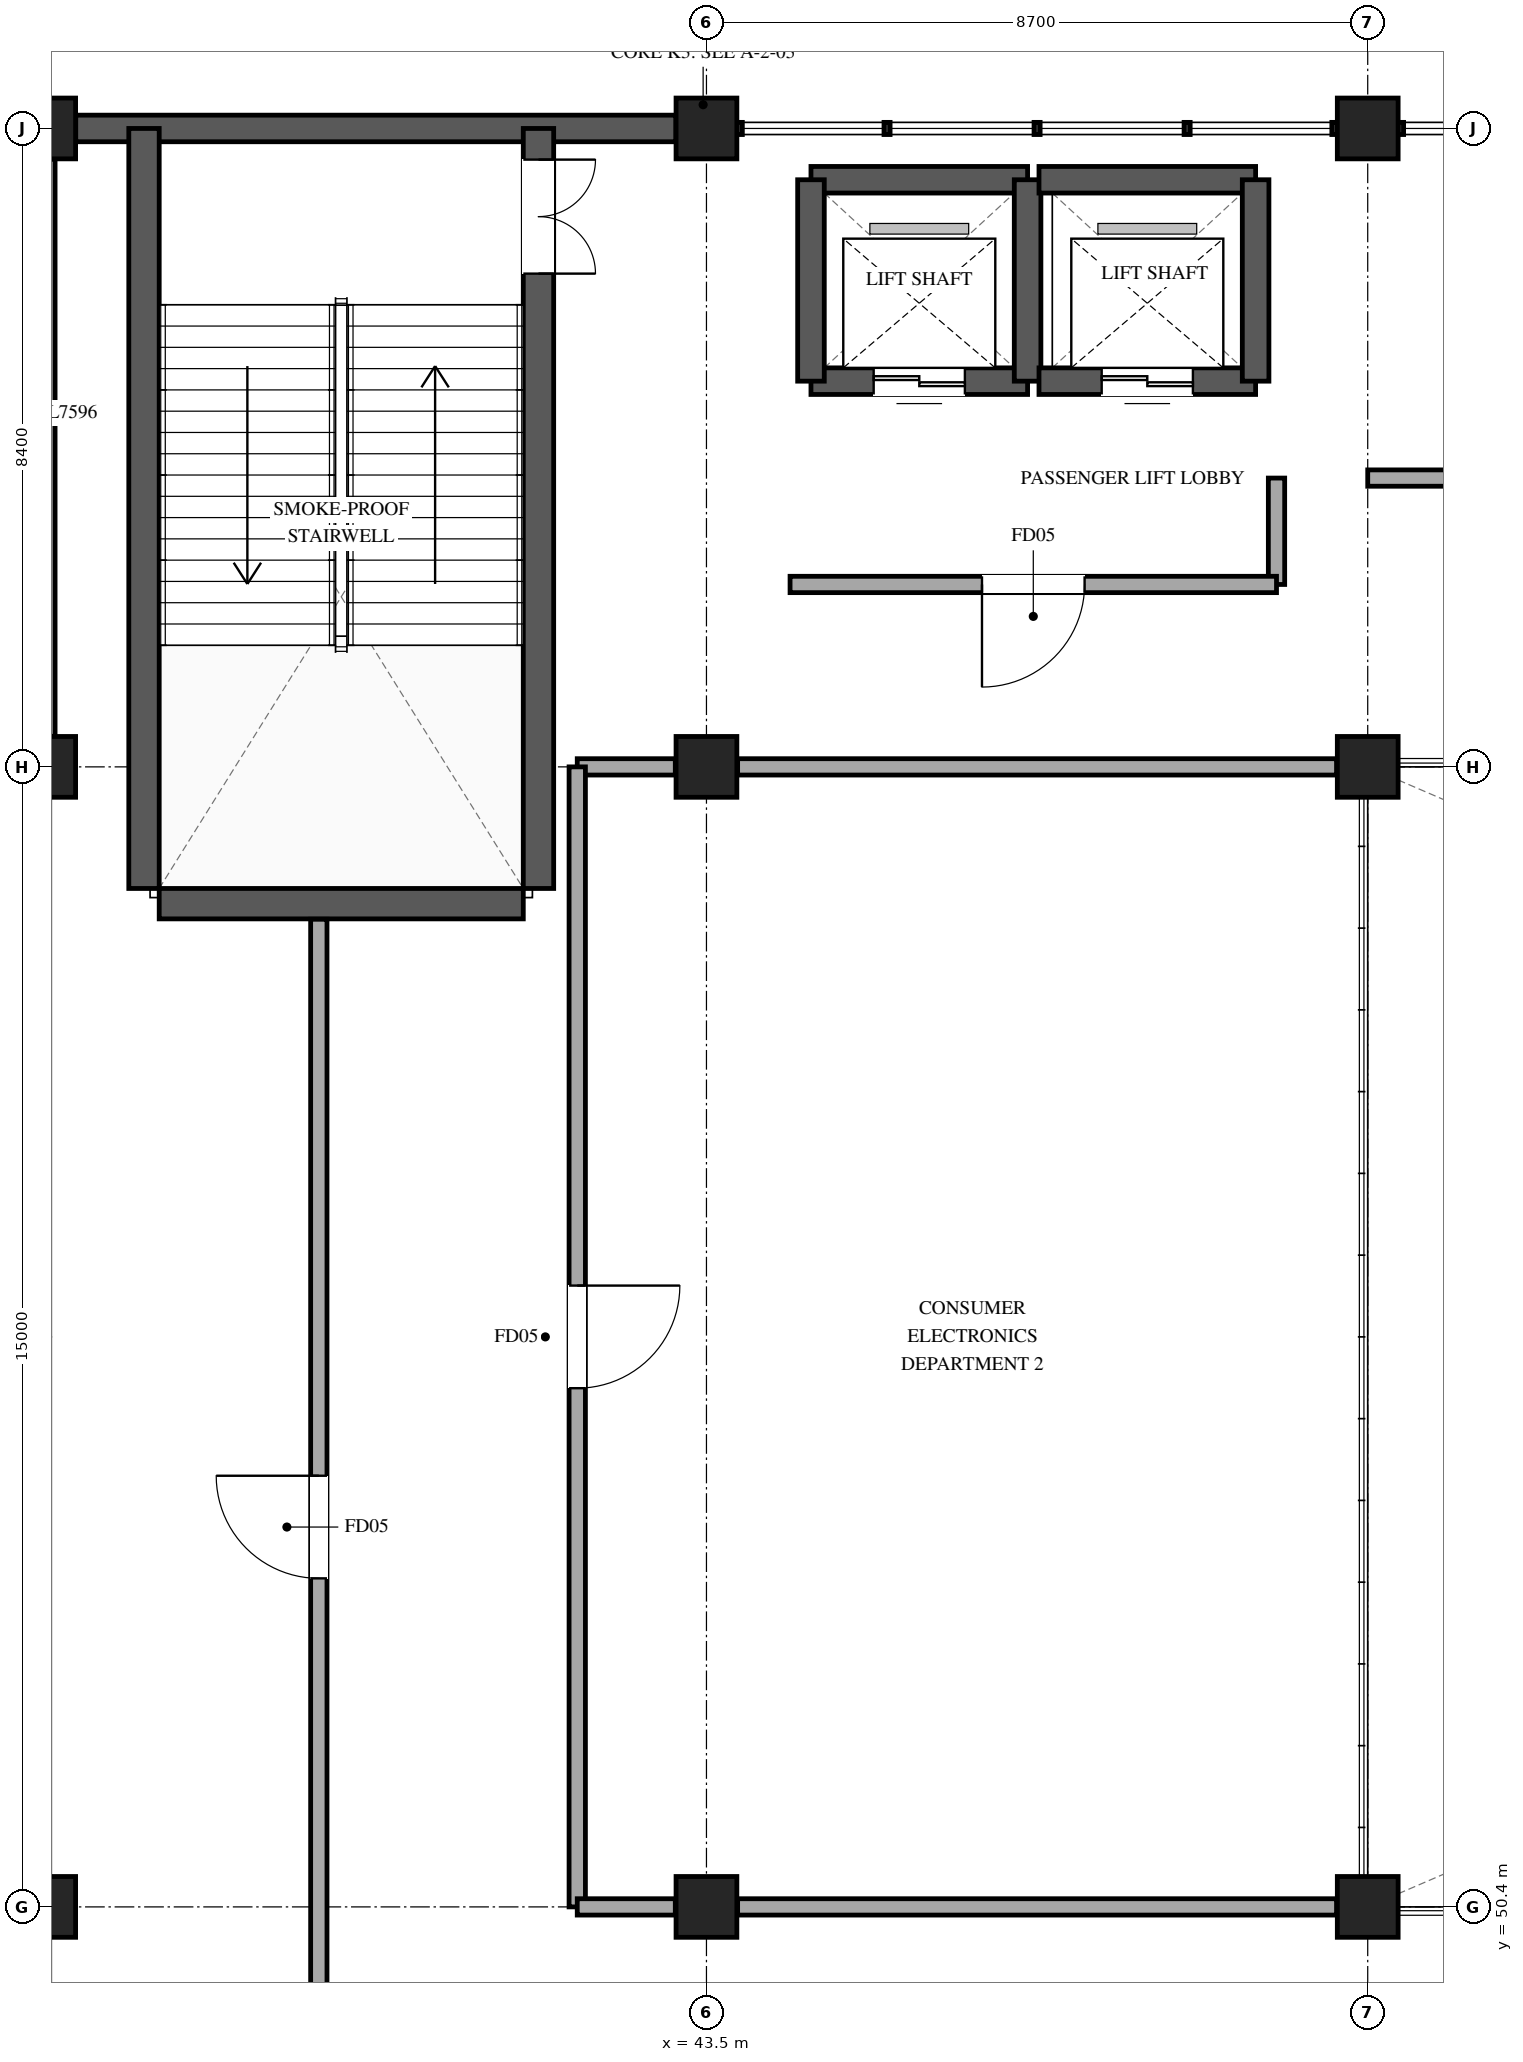
"""IFC4 building model, lengths in metres.
Left out: names, types, materials, properties, quantities, classifications, styles, units other than length and angle.
Written with IfcOpenShell. Run it as: python <this file> out.ifc"""

import sys

from ifc_helpers import new_model, si_unit, direction, frame, frame_2d, origin, origin_2d, place, context, subcontext, project, spatial, rectangle, extrude, element, fill, save


model = new_model("IFC4")
c1 = context("Model", 3, precision=1e-05, world=origin(), true_north=direction((0.0, 1.0)))
c2 = subcontext(c1, "Body", "Model", "MODEL_VIEW")
j1 = project(units=[si_unit("LENGTHUNIT", "METRE"), si_unit("PLANEANGLEUNIT", "RADIAN")], contexts=[c1])
p1 = place(None, origin())
s1 = spatial("IfcSite", under=j1, at=p1, CompositionType="ELEMENT")
p2 = place(p1, origin())
s2 = spatial("IfcBuilding", under=s1, at=p2, CompositionType="ELEMENT")
p3 = place(p2, frame((0.0, 0.0, 16.5)))
s3 = spatial("IfcBuildingStorey", under=s2, at=p3, CompositionType="ELEMENT", Elevation=16.5)
for number, where, z_axis, x_axis in (
    (1, (34.8, 50.4, 0.0), (0.0, 0.0, 1.0), (1.0, 0.0, 0.0)),
    (2, (34.8, 65.4, 0.0), (0.0, 0.0, 1.0), (1.0, 0.0, 0.0)),
    (3, (34.8, 73.8, 0.0), (0.0, 0.0, 1.0), (1.0, 0.0, 0.0)),
    (4, (43.5, 50.4, 0.0), (0.0, 0.0, 1.0), (1.0, 0.0, 0.0)),
    (5, (43.5, 65.4, 0.0), (0.0, 0.0, 1.0), (1.0, 0.0, 0.0)),
    (6, (43.5, 73.8, 0.0), (0.0, 0.0, 1.0), (1.0, 0.0, 0.0)),
    (7, (52.2, 50.4, 0.0), (0.0, 0.0, 1.0), (1.0, 0.0, 0.0)),
    (8, (52.2, 65.4, 0.0), (0.0, 0.0, 1.0), (1.0, 0.0, 0.0)),
    (9, (52.2, 73.8, 0.0), (0.0, 0.0, 1.0), (1.0, 0.0, 0.0)),
):
    element("IfcColumn", number, at=place(p3, frame(where, z_axis=z_axis, x_axis=x_axis)), inside=s3, PredefinedType="COLUMN", context=c2, shape_type="SweptSolid", body=[
        extrude(rectangle(XDim=0.8, YDim=0.8, at=origin_2d()), origin(), (0.0, 0.0, 1.0), 5.1),
    ])
p4 = place(p3, frame((34.8, 65.802, 0.0), z_axis=(0.0, 0.0, 1.0), x_axis=(0.0, 1.0, 0.0)))
e10 = element("IfcWall", 10, at=p4, inside=s3, PredefinedType="STANDARD", context=c2, shape_type="SweptSolid", body=[
    extrude(rectangle(XDim=7.596, YDim=0.26, at=frame_2d((3.798, 0.0))), origin(), (0.0, 0.0, 1.0), 4.255),
])
p5 = place(p3, frame((35.202, 73.8, 0.0), z_axis=(0.0, 0.0, 1.0), x_axis=(1.0, 0.0, 0.0)))
e11 = element("IfcWall", 11, at=p5, inside=s3, PredefinedType="STANDARD", context=c2, shape_type="SweptSolid", body=[
    extrude(rectangle(XDim=7.896, YDim=0.35, at=frame_2d((3.948, 0.0))), origin(), (0.0, 0.0, 1.0), 4.79),
])
p6 = place(p3, frame((36.1, 63.8, 0.0), z_axis=(0.0, 0.0, 1.0), x_axis=(0.0, 1.0, 0.0)))
e12 = element("IfcWall", 12, at=p6, inside=s3, PredefinedType="SHEAR", context=c2, shape_type="SweptSolid", body=[
    extrude(rectangle(XDim=10.0, YDim=0.4, at=frame_2d((5.0, 0.0))), origin(), (0.0, 0.0, 1.0), 5.1),
])
p7 = place(p3, frame((41.29, 73.8, 0.0), z_axis=(0.0, 0.0, 1.0), x_axis=(0.0, -1.0, 0.0)))
e13 = element("IfcWall", 13, at=p7, inside=s3, PredefinedType="SHEAR", context=c2, shape_type="SweptSolid", body=[
    extrude(rectangle(XDim=10.0, YDim=0.4, at=frame_2d((5.0, 0.0))), origin(), (0.0, 0.0, 1.0), 5.1),
])
p8 = place(p7, frame((0.41, 0.0, 0.0)))
e14 = element("IfcOpeningElement", 14, at=p8, cuts=e13, PredefinedType="OPENING", context=c2, shape_type="SweptSolid", body=[
    extrude(rectangle(XDim=1.5, YDim=2.2, at=frame_2d((0.75, 1.1))), frame((0.0, 0.21, 0.0), z_axis=(0.0, -1.0, 0.0), x_axis=(1.0, 0.0, 0.0)), (0.0, 0.0, 1.0), 0.42),
])
p9 = place(p3, frame((41.09, 63.6, 0.0), z_axis=(0.0, 0.0, 1.0), x_axis=(-1.0, 0.0, 0.0)))
e15 = element("IfcWall", 15, at=p9, inside=s3, PredefinedType="SHEAR", context=c2, shape_type="SweptSolid", body=[
    extrude(rectangle(XDim=4.79, YDim=0.4, at=frame_2d((2.395, 0.0))), origin(), (0.0, 0.0, 1.0), 5.1),
])
p10 = place(p3, frame((44.875, 73.125, 0.0), z_axis=(0.0, 0.0, 1.0), x_axis=(1.0, 0.0, 0.0)))
e16 = element("IfcWall", 16, at=p10, inside=s3, PredefinedType="SHEAR", context=c2, shape_type="SweptSolid", body=[
    extrude(rectangle(XDim=2.85, YDim=0.35, at=frame_2d((1.425, 0.0))), origin(), (0.0, 0.0, 1.0), 5.1),
])
p11 = place(p3, frame((47.725, 70.475, 0.0), z_axis=(0.0, 0.0, 1.0), x_axis=(-1.0, 0.0, 0.0)))
e17 = element("IfcWall", 17, at=p11, inside=s3, PredefinedType="SHEAR", context=c2, shape_type="SweptSolid", body=[
    extrude(rectangle(XDim=2.85, YDim=0.35, at=frame_2d((1.425, 0.0))), origin(), (0.0, 0.0, 1.0), 5.1),
])
p12 = place(p11, frame((0.825, 0.0, 0.0)))
e18 = element("IfcOpeningElement", 18, at=p12, cuts=e17, PredefinedType="OPENING", context=c2, shape_type="SweptSolid", body=[
    extrude(rectangle(XDim=1.2, YDim=2.2, at=frame_2d((0.6, 1.1))), frame((0.0, 0.185, 0.0), z_axis=(0.0, -1.0, 0.0), x_axis=(1.0, 0.0, 0.0)), (0.0, 0.0, 1.0), 0.37),
])
for number, where, z_axis, x_axis in (
    (19, (44.875, 70.475, 0.0), (0.0, 0.0, 1.0), (0.0, 1.0, 0.0)),
    (20, (47.725, 73.125, 0.0), (0.0, 0.0, 1.0), (0.0, -1.0, 0.0)),
):
    element("IfcWall", number, at=place(p3, frame(where, z_axis=z_axis, x_axis=x_axis)), inside=s3, PredefinedType="SHEAR", context=c2, shape_type="SweptSolid", body=[
        extrude(rectangle(XDim=2.65, YDim=0.35, at=frame_2d((1.325, 0.0))), origin(), (0.0, 0.0, 1.0), 5.1),
    ])
p13 = place(p3, frame((47.875, 73.125, 0.0), z_axis=(0.0, 0.0, 1.0), x_axis=(1.0, 0.0, 0.0)))
e21 = element("IfcWall", 21, at=p13, inside=s3, PredefinedType="SHEAR", context=c2, shape_type="SweptSolid", body=[
    extrude(rectangle(XDim=2.85, YDim=0.35, at=frame_2d((1.425, 0.0))), origin(), (0.0, 0.0, 1.0), 5.1),
])
p14 = place(p3, frame((50.725, 70.475, 0.0), z_axis=(0.0, 0.0, 1.0), x_axis=(-1.0, 0.0, 0.0)))
e22 = element("IfcWall", 22, at=p14, inside=s3, PredefinedType="SHEAR", context=c2, shape_type="SweptSolid", body=[
    extrude(rectangle(XDim=2.85, YDim=0.35, at=frame_2d((1.425, 0.0))), origin(), (0.0, 0.0, 1.0), 5.1),
])
p15 = place(p14, frame((0.825, 0.0, 0.0)))
e23 = element("IfcOpeningElement", 23, at=p15, cuts=e22, PredefinedType="OPENING", context=c2, shape_type="SweptSolid", body=[
    extrude(rectangle(XDim=1.2, YDim=2.2, at=frame_2d((0.6, 1.1))), frame((0.0, 0.185, 0.0), z_axis=(0.0, -1.0, 0.0), x_axis=(1.0, 0.0, 0.0)), (0.0, 0.0, 1.0), 0.37),
])
p16 = place(p3, frame((50.725, 73.125, 0.0), z_axis=(0.0, 0.0, 1.0), x_axis=(0.0, -1.0, 0.0)))
e24 = element("IfcWall", 24, at=p16, inside=s3, PredefinedType="SHEAR", context=c2, shape_type="SweptSolid", body=[
    extrude(rectangle(XDim=2.65, YDim=0.35, at=frame_2d((1.325, 0.0))), origin(), (0.0, 0.0, 1.0), 5.1),
])
p17 = place(p3, frame((51.0, 69.2, 0.0), z_axis=(0.0, 0.0, 1.0), x_axis=(0.0, -1.0, 0.0)))
e25 = element("IfcWall", 25, at=p17, inside=s3, PredefinedType="PARTITIONING", context=c2, shape_type="SweptSolid", body=[
    extrude(rectangle(XDim=1.4, YDim=0.215, at=frame_2d((0.7, 0.0))), origin(), (0.0, 0.0, 1.0), 4.76),
])
p18 = place(p3, frame((51.0, 67.8, 0.0), z_axis=(0.0, 0.0, 1.0), x_axis=(-1.0, 0.0, 0.0)))
e26 = element("IfcWall", 26, at=p18, inside=s3, PredefinedType="PARTITIONING", context=c2, shape_type="SweptSolid", body=[
    extrude(rectangle(XDim=6.4, YDim=0.215, at=frame_2d((3.2, 0.0))), origin(), (0.0, 0.0, 1.0), 4.76),
])
p19 = place(p18, frame((2.525, 0.0, 0.0)))
e27 = element("IfcOpeningElement", 27, at=p19, cuts=e26, PredefinedType="OPENING", context=c2, shape_type="SweptSolid", body=[
    extrude(rectangle(XDim=1.35, YDim=2.2, at=frame_2d((0.675, 1.1))), frame((0.0, 0.118, 0.0), z_axis=(0.0, -1.0, 0.0), x_axis=(1.0, 0.0, 0.0)), (0.0, 0.0, 1.0), 0.235),
])
p20 = place(p3, frame((38.4, 47.4, 0.0), z_axis=(0.0, 0.0, 1.0), x_axis=(0.0, 1.0, 0.0)))
e28 = element("IfcWall", 28, at=p20, inside=s3, PredefinedType="PARTITIONING", context=c2, shape_type="SweptSolid", body=[
    extrude(rectangle(XDim=15.995, YDim=0.215, at=frame_2d((7.998, 0.0))), origin(), (0.0, 0.0, 1.0), 4.06),
])
p21 = place(p20, frame((7.323, 0.0, 0.0)))
e29 = element("IfcOpeningElement", 29, at=p21, cuts=e28, PredefinedType="OPENING", context=c2, shape_type="SweptSolid", body=[
    extrude(rectangle(XDim=1.35, YDim=2.2, at=frame_2d((0.675, 1.1))), frame((0.0, 0.118, 0.0), z_axis=(0.0, -1.0, 0.0), x_axis=(1.0, 0.0, 0.0)), (0.0, 0.0, 1.0), 0.235),
])
p22 = place(p3, frame((51.79, 65.4, 0.0), z_axis=(0.0, 0.0, 1.0), x_axis=(-1.0, 0.0, 0.0)))
e30 = element("IfcWall", 30, at=p22, inside=s3, PredefinedType="PARTITIONING", context=c2, shape_type="SweptSolid", body=[
    extrude(rectangle(XDim=7.88, YDim=0.215, at=frame_2d((3.94, 0.0))), origin(), (0.0, 0.0, 1.0), 4.06),
])
p23 = place(p3, frame((43.09, 65.4, 0.0), z_axis=(0.0, 0.0, 1.0), x_axis=(-1.0, 0.0, 0.0)))
e31 = element("IfcWall", 31, at=p23, inside=s3, PredefinedType="PARTITIONING", context=c2, shape_type="SweptSolid", body=[
    extrude(rectangle(XDim=1.29, YDim=0.215, at=frame_2d((0.645, 0.0))), origin(), (0.0, 0.0, 1.0), 4.76),
])
p24 = place(p3, frame((41.8, 65.4, 0.0), z_axis=(0.0, 0.0, 1.0), x_axis=(0.0, -1.0, 0.0)))
e32 = element("IfcWall", 32, at=p24, inside=s3, PredefinedType="PARTITIONING", context=c2, shape_type="SweptSolid", body=[
    extrude(rectangle(XDim=15.0, YDim=0.215, at=frame_2d((7.5, 0.0))), origin(), (0.0, 0.0, 1.0), 4.06),
])
p25 = place(p24, frame((6.825, 0.0, 0.0)))
e33 = element("IfcOpeningElement", 33, at=p25, cuts=e32, PredefinedType="OPENING", context=c2, shape_type="SweptSolid", body=[
    extrude(rectangle(XDim=1.35, YDim=2.2, at=frame_2d((0.675, 1.1))), frame((0.0, 0.118, 0.0), z_axis=(0.0, -1.0, 0.0), x_axis=(1.0, 0.0, 0.0)), (0.0, 0.0, 1.0), 0.235),
])
p26 = place(p3, frame((41.8, 50.4, 0.0), z_axis=(0.0, 0.0, 1.0), x_axis=(1.0, 0.0, 0.0)))
e34 = element("IfcWall", 34, at=p26, inside=s3, PredefinedType="PARTITIONING", context=c2, shape_type="SweptSolid", body=[
    extrude(rectangle(XDim=1.29, YDim=0.215, at=frame_2d((0.645, 0.0))), origin(), (0.0, 0.0, 1.0), 4.06),
])
p27 = place(p3, frame((43.91, 50.4, 0.0), z_axis=(0.0, 0.0, 1.0), x_axis=(1.0, 0.0, 0.0)))
e35 = element("IfcWall", 35, at=p27, inside=s3, PredefinedType="PARTITIONING", context=c2, shape_type="SweptSolid", body=[
    extrude(rectangle(XDim=7.88, YDim=0.215, at=frame_2d((3.94, 0.0))), origin(), (0.0, 0.0, 1.0), 4.06),
])
p28 = place(p3, frame((52.2, 69.2, 0.0), z_axis=(0.0, 0.0, 1.0), x_axis=(1.0, 0.0, 0.0)))
e36 = element("IfcWall", 36, at=p28, inside=s3, PredefinedType="PARTITIONING", context=c2, shape_type="SweptSolid", body=[
    extrude(rectangle(XDim=36.0, YDim=0.215, at=frame_2d((18.0, 0.0))), origin(), (0.0, 0.0, 1.0), 4.06),
])
p29 = place(p28, frame((17.325, 0.0, 0.0)))
e37 = element("IfcOpeningElement", 37, at=p29, cuts=e36, PredefinedType="OPENING", context=c2, shape_type="SweptSolid", body=[
    extrude(rectangle(XDim=1.35, YDim=2.2, at=frame_2d((0.675, 1.1))), frame((0.0, 0.118, 0.0), z_axis=(0.0, -1.0, 0.0), x_axis=(1.0, 0.0, 0.0)), (0.0, 0.0, 1.0), 0.235),
])
p30 = place(p8, origin())
e38 = element("IfcDoor", 38, at=p30, inside=s3, OperationType="DOUBLE_DOOR_SINGLE_SWING", PredefinedType="DOOR", context=c2, shape_type="SweptSolid", body=[
    extrude(rectangle(XDim=1.5, YDim=2.2, at=frame_2d((0.75, 1.1))), frame((0.0, 0.025, 0.0), z_axis=(0.0, -1.0, 0.0), x_axis=(1.0, 0.0, 0.0)), (0.0, 0.0, 1.0), 0.05),
])
fill(e14, e38)
p31 = place(p12, origin())
e39 = element("IfcDoor", 39, at=p31, inside=s3, OperationType="DOUBLE_DOOR_SLIDING", PredefinedType="DOOR", context=c2, shape_type="SweptSolid", body=[
    extrude(rectangle(XDim=1.2, YDim=2.2, at=frame_2d((0.6, 1.1))), frame((0.0, 0.025, 0.0), z_axis=(0.0, -1.0, 0.0), x_axis=(1.0, 0.0, 0.0)), (0.0, 0.0, 1.0), 0.05),
])
fill(e18, e39)
p32 = place(p15, origin())
e40 = element("IfcDoor", 40, at=p32, inside=s3, OperationType="DOUBLE_DOOR_SLIDING", PredefinedType="DOOR", context=c2, shape_type="SweptSolid", body=[
    extrude(rectangle(XDim=1.2, YDim=2.2, at=frame_2d((0.6, 1.1))), frame((0.0, 0.025, 0.0), z_axis=(0.0, -1.0, 0.0), x_axis=(1.0, 0.0, 0.0)), (0.0, 0.0, 1.0), 0.05),
])
fill(e23, e40)
p33 = place(p19, origin())
e41 = element("IfcDoor", 41, at=p33, inside=s3, OperationType="SINGLE_SWING_RIGHT", PredefinedType="DOOR", context=c2, shape_type="SweptSolid", body=[
    extrude(rectangle(XDim=1.35, YDim=2.2, at=frame_2d((0.675, 1.1))), frame((0.0, 0.025, 0.0), z_axis=(0.0, -1.0, 0.0), x_axis=(1.0, 0.0, 0.0)), (0.0, 0.0, 1.0), 0.05),
])
fill(e27, e41)
p34 = place(p21, origin())
e42 = element("IfcDoor", 42, at=p34, inside=s3, OperationType="SINGLE_SWING_RIGHT", PredefinedType="DOOR", context=c2, shape_type="SweptSolid", body=[
    extrude(rectangle(XDim=1.35, YDim=2.2, at=frame_2d((0.675, 1.1))), frame((0.0, 0.025, 0.0), z_axis=(0.0, -1.0, 0.0), x_axis=(1.0, 0.0, 0.0)), (0.0, 0.0, 1.0), 0.05),
])
fill(e29, e42)
p35 = place(p25, origin())
e43 = element("IfcDoor", 43, at=p35, inside=s3, OperationType="SINGLE_SWING_LEFT", PredefinedType="DOOR", context=c2, shape_type="SweptSolid", body=[
    extrude(rectangle(XDim=1.35, YDim=2.2, at=frame_2d((0.675, 1.1))), frame((0.0, 0.025, 0.0), z_axis=(0.0, -1.0, 0.0), x_axis=(1.0, 0.0, 0.0)), (0.0, 0.0, 1.0), 0.05),
])
fill(e33, e43)
save(model, sys.argv[1])
